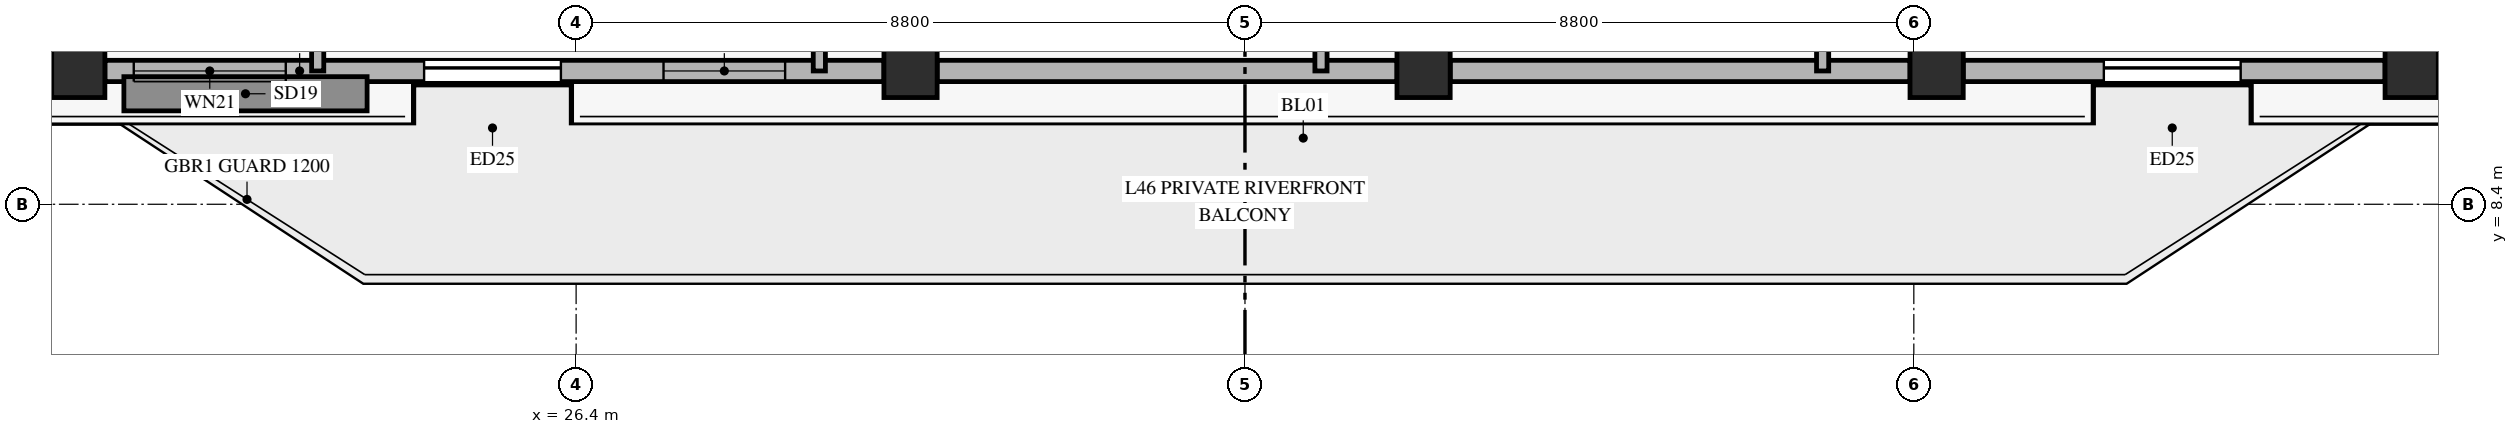
"""IFC4 building model, lengths in metres.
Left out: names, types, materials, properties, quantities, classifications, styles, units other than length and angle.
Written with IfcOpenShell. Run it as: python <this file> out.ifc"""

import sys

from ifc_helpers import new_model, si_unit, direction, frame, frame_2d, origin, origin_2d, place, context, subcontext, project, spatial, rectangle, hollow_rectangle, extrude, source, transform, mapped, element, fill, save


model = new_model("IFC4")
c1 = context("Model", 3, precision=1e-05, world=origin(), true_north=direction((0.0, 1.0)))
c2 = subcontext(c1, "Body", "Model", "MODEL_VIEW")
j1 = project(units=[si_unit("LENGTHUNIT", "METRE"), si_unit("PLANEANGLEUNIT", "RADIAN")], contexts=[c1])
p1 = place(None, origin())
s1 = spatial("IfcSite", under=j1, at=p1, CompositionType="ELEMENT")
p2 = place(p1, origin())
s2 = spatial("IfcBuilding", under=s1, at=p2, CompositionType="ELEMENT")
p3 = place(p2, frame((0.0, 0.0, 184.2)))
s3 = spatial("IfcBuildingStorey", under=s2, at=p3, CompositionType="ELEMENT", Elevation=184.2)
m1 = source(origin(), c2, "Body", "SweptSolid", [
    extrude(hollow_rectangle(XDim=0.7, YDim=0.7, WallThickness=0.032, at=origin_2d()), origin(), (0.0, 0.0, 1.0), 3.27),
])
for number, where, z_axis, x_axis in (
    (1, (19.85, 10.154, 0.0), (0.0, 0.0, 1.0), (1.0, 0.0, 0.0)),
    (2, (30.8, 10.154, 0.0), (0.0, 0.0, 1.0), (1.0, 0.0, 0.0)),
    (3, (37.55, 10.154, 0.0), (0.0, 0.0, 1.0), (1.0, 0.0, 0.0)),
    (4, (44.3, 10.154, 0.0), (0.0, 0.0, 1.0), (1.0, 0.0, 0.0)),
    (5, (50.55, 10.154, 0.0), (0.0, 0.0, 1.0), (1.0, 0.0, 0.0)),
):
    element("IfcColumn", number, at=place(p3, frame(where, z_axis=z_axis, x_axis=x_axis)), inside=s3, PredefinedType="COLUMN", context=c2, shape_type="MappedRepresentation", body=[
        mapped(m1, transform((0.0, 0.0, 0.0), x_axis=(1.0, 0.0, 0.0), y_axis=(0.0, 1.0, 0.0), z_axis=(0.0, 0.0, 1.0), scale=1.0)),
    ])
p4 = place(p3, frame((20.2, 10.154, 0.0), z_axis=(0.0, 0.0, 1.0), x_axis=(1.0, 0.0, 0.0)))
e6 = element("IfcWall", 6, at=p4, inside=s3, PredefinedType="SOLIDWALL", context=c2, shape_type="SweptSolid", body=[
    extrude(rectangle(XDim=10.25, YDim=0.28, at=frame_2d((5.125, 0.0))), origin(), (0.0, 0.0, 1.0), 2.75),
])
p5 = place(p4, frame((4.2, 0.0, 0.0)))
e7 = element("IfcOpeningElement", 7, at=p5, cuts=e6, PredefinedType="OPENING", context=c2, shape_type="SweptSolid", body=[
    extrude(rectangle(XDim=1.8, YDim=2.25, at=frame_2d((0.9, 1.125))), frame((0.0, 0.15, 0.0), z_axis=(0.0, -1.0, 0.0), x_axis=(1.0, 0.0, 0.0)), (0.0, 0.0, 1.0), 0.3),
])
p6 = place(p4, frame((0.38, 0.0, 0.45)))
e8 = element("IfcOpeningElement", 8, at=p6, cuts=e6, PredefinedType="OPENING", context=c2, shape_type="SweptSolid", body=[
    extrude(rectangle(XDim=2.0, YDim=2.0, at=frame_2d((1.0, 1.0))), frame((0.0, 0.15, 0.0), z_axis=(0.0, -1.0, 0.0), x_axis=(1.0, 0.0, 0.0)), (0.0, 0.0, 1.0), 0.3),
])
p7 = place(p4, frame((7.35, 0.0, 0.45)))
e9 = element("IfcOpeningElement", 9, at=p7, cuts=e6, PredefinedType="OPENING", context=c2, shape_type="SweptSolid", body=[
    extrude(rectangle(XDim=1.6, YDim=2.0, at=frame_2d((0.8, 1.0))), frame((0.0, 0.15, 0.0), z_axis=(0.0, -1.0, 0.0), x_axis=(1.0, 0.0, 0.0)), (0.0, 0.0, 1.0), 0.3),
])
for number, where, z_axis, x_axis in (
    (10, (31.15, 10.154, 0.0), (0.0, 0.0, 1.0), (1.0, 0.0, 0.0)),
    (11, (37.9, 10.154, 0.0), (0.0, 0.0, 1.0), (1.0, 0.0, 0.0)),
):
    element("IfcWall", number, at=place(p3, frame(where, z_axis=z_axis, x_axis=x_axis)), inside=s3, PredefinedType="SOLIDWALL", context=c2, shape_type="SweptSolid", body=[
        extrude(rectangle(XDim=6.05, YDim=0.28, at=frame_2d((3.025, 0.0))), origin(), (0.0, 0.0, 1.0), 2.75),
    ])
p8 = place(p3, frame((44.65, 10.154, 0.0), z_axis=(0.0, 0.0, 1.0), x_axis=(1.0, 0.0, 0.0)))
e12 = element("IfcWall", 12, at=p8, inside=s3, PredefinedType="SOLIDWALL", context=c2, shape_type="SweptSolid", body=[
    extrude(rectangle(XDim=5.55, YDim=0.28, at=frame_2d((2.775, 0.0))), origin(), (0.0, 0.0, 1.0), 2.75),
])
p9 = place(p8, frame((1.85, 0.0, 0.0)))
e13 = element("IfcOpeningElement", 13, at=p9, cuts=e12, PredefinedType="OPENING", context=c2, shape_type="SweptSolid", body=[
    extrude(rectangle(XDim=1.8, YDim=2.25, at=frame_2d((0.9, 1.125))), frame((0.0, 0.15, 0.0), z_axis=(0.0, -1.0, 0.0), x_axis=(1.0, 0.0, 0.0)), (0.0, 0.0, 1.0), 0.3),
])
for number, where, z_axis, x_axis in (
    (14, (23.0, 10.154, 0.0), (0.0, 0.0, 1.0), (0.0, 1.0, 0.0)),
    (15, (29.6, 10.154, 0.0), (0.0, 0.0, 1.0), (0.0, 1.0, 0.0)),
    (16, (36.2, 10.154, 0.0), (0.0, 0.0, 1.0), (0.0, 1.0, 0.0)),
    (17, (42.8, 10.154, 0.0), (0.0, 0.0, 1.0), (0.0, 1.0, 0.0)),
):
    element("IfcWall", number, at=place(p3, frame(where, z_axis=z_axis, x_axis=x_axis)), inside=s3, PredefinedType="PARTITIONING", context=c2, shape_type="SweptSolid", body=[
        extrude(rectangle(XDim=24.846, YDim=0.16, at=frame_2d((12.423, 0.0))), origin(), (0.0, 0.0, 1.0), 2.755),
    ])
m2 = source(origin(), c2, "Body", "SweptSolid", [
    extrude(rectangle(XDim=1.8, YDim=2.25, at=frame_2d((0.9, 1.125))), frame((0.0, 0.025, 0.0), z_axis=(0.0, -1.0, 0.0), x_axis=(1.0, 0.0, 0.0)), (0.0, 0.0, 1.0), 0.05),
])
p10 = place(p5, origin())
e18 = element("IfcDoor", 18, at=p10, inside=s3, OperationType="SLIDING_TO_LEFT", PredefinedType="DOOR", context=c2, shape_type="MappedRepresentation", body=[
    mapped(m2, transform((0.0, 0.0, 0.0), x_axis=(1.0, 0.0, 0.0), y_axis=(0.0, 1.0, 0.0), z_axis=(0.0, 0.0, 1.0), scale=1.0)),
])
fill(e7, e18)
m3 = source(origin(), c2, "Body", "SweptSolid", [
    extrude(rectangle(XDim=2.0, YDim=2.0, at=frame_2d((1.0, 1.0))), frame((0.0, 0.03, 0.0), z_axis=(0.0, -1.0, 0.0), x_axis=(1.0, 0.0, 0.0)), (0.0, 0.0, 1.0), 0.06),
])
p11 = place(p6, origin())
e19 = element("IfcWindow", 19, at=p11, inside=s3, PartitioningType="SINGLE_PANEL", PredefinedType="WINDOW", context=c2, shape_type="MappedRepresentation", body=[
    mapped(m3, transform((0.0, 0.0, 0.0), x_axis=(1.0, 0.0, 0.0), y_axis=(0.0, 1.0, 0.0), z_axis=(0.0, 0.0, 1.0), scale=1.0)),
])
fill(e8, e19)
m4 = source(origin(), c2, "Body", "SweptSolid", [
    extrude(rectangle(XDim=1.6, YDim=2.0, at=frame_2d((0.8, 1.0))), frame((0.0, 0.03, 0.0), z_axis=(0.0, -1.0, 0.0), x_axis=(1.0, 0.0, 0.0)), (0.0, 0.0, 1.0), 0.06),
])
p12 = place(p7, origin())
e20 = element("IfcWindow", 20, at=p12, inside=s3, PartitioningType="SINGLE_PANEL", PredefinedType="WINDOW", context=c2, shape_type="MappedRepresentation", body=[
    mapped(m4, transform((0.0, 0.0, 0.0), x_axis=(1.0, 0.0, 0.0), y_axis=(0.0, 1.0, 0.0), z_axis=(0.0, 0.0, 1.0), scale=1.0)),
])
fill(e9, e20)
p13 = place(p9, origin())
e21 = element("IfcDoor", 21, at=p13, inside=s3, OperationType="SLIDING_TO_LEFT", PredefinedType="DOOR", context=c2, shape_type="MappedRepresentation", body=[
    mapped(m2, transform((0.0, 0.0, 0.0), x_axis=(1.0, 0.0, 0.0), y_axis=(0.0, 1.0, 0.0), z_axis=(0.0, 0.0, 1.0), scale=1.0)),
])
fill(e13, e21)
save(model, sys.argv[1])
